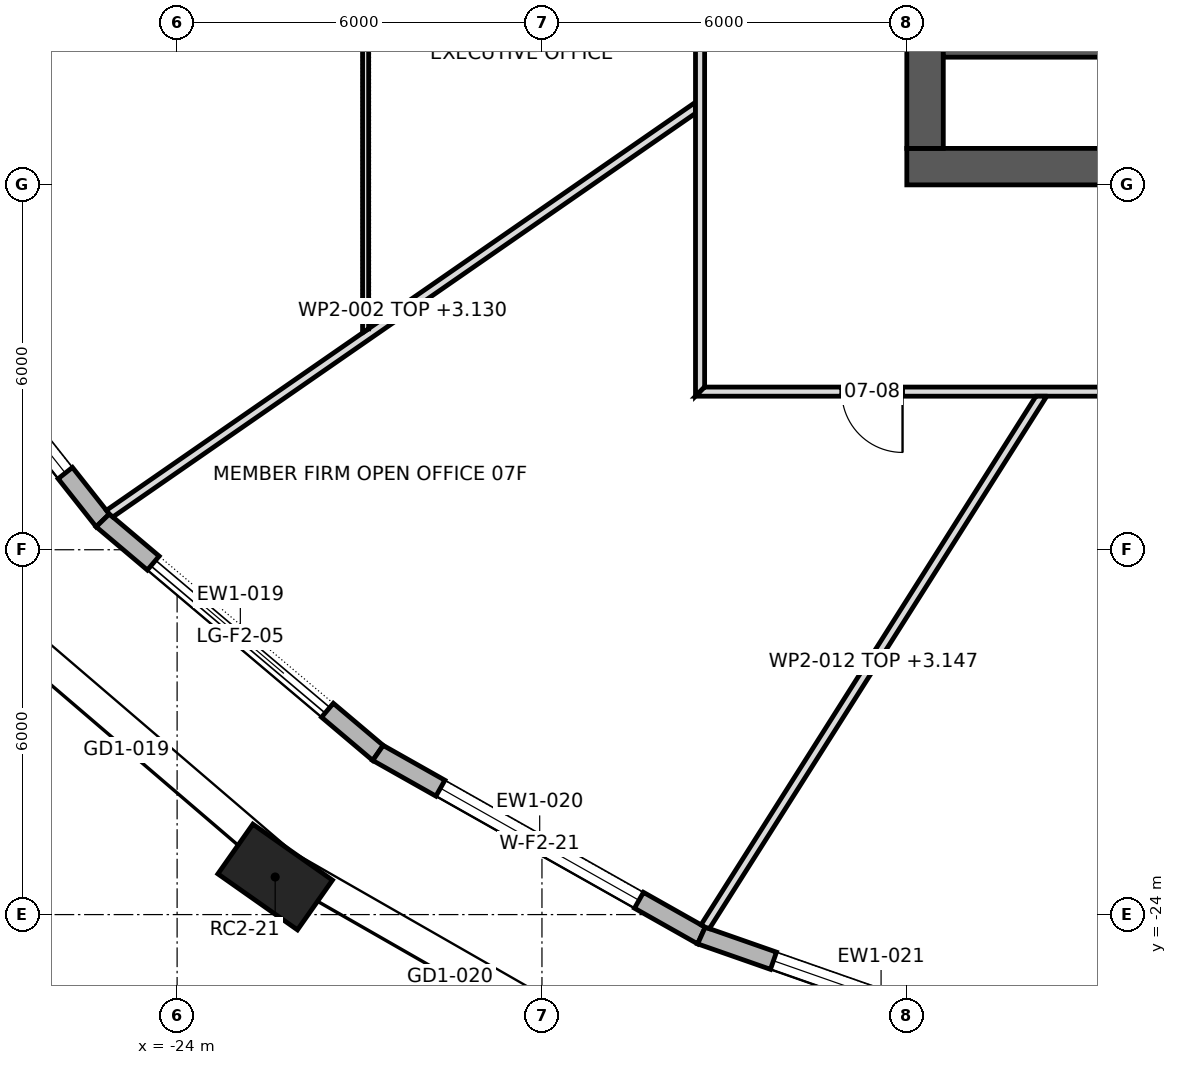
"""IFC4 building model, lengths in metres.
Left out: names, types, materials, properties, quantities, classifications, styles, units other than length and angle.
Written with IfcOpenShell. Run it as: python <this file> out.ifc"""

import sys

from ifc_helpers import new_model, si_unit, direction, frame, frame_2d, origin, origin_2d, place, context, subcontext, project, spatial, polyline, rectangle, outline, extrude, element, fill, save


model = new_model("IFC4")
c1 = context("Model", 3, precision=1e-05, world=origin(), true_north=direction((0.0, 1.0)))
c2 = subcontext(c1, "Body", "Model", "MODEL_VIEW")
j1 = project(units=[si_unit("LENGTHUNIT", "METRE"), si_unit("PLANEANGLEUNIT", "RADIAN")], contexts=[c1])
p1 = place(None, origin())
s1 = spatial("IfcSite", under=j1, at=p1, CompositionType="ELEMENT")
p2 = place(p1, origin())
s2 = spatial("IfcBuilding", under=s1, at=p2, CompositionType="ELEMENT")
p3 = place(p2, frame((0.0, 0.0, 104.5)))
s3 = spatial("IfcBuildingStorey", under=s2, at=p3, CompositionType="ELEMENT", Elevation=104.5)
p4 = place(p3, frame((-22.387, -23.382, 0.0), z_axis=(0.0, 0.0, 1.0), x_axis=(0.817910796357, -0.575345052297, 0.0)))
e1 = element("IfcColumn", 1, at=p4, inside=s3, PredefinedType="COLUMN", context=c2, shape_type="SweptSolid", body=[
    extrude(rectangle(XDim=1.6, YDim=1.0, at=origin_2d()), origin(), (0.0, 0.0, 1.0), 4.2),
])
p5 = place(p3, frame((-12.0, -11.7, 0.0), z_axis=(0.0, 0.0, 1.0), x_axis=(1.0, 0.0, 0.0)))
e2 = element("IfcWall", 2, at=p5, inside=s3, PredefinedType="SHEAR", context=c2, shape_type="SweptSolid", body=[
    extrude(rectangle(XDim=24.0, YDim=0.6, at=frame_2d((12.0, 0.0))), origin(), (0.0, 0.0, 1.0), 4.2),
])
p6 = place(p5, frame((9.975, 0.0, 0.0)))
e3 = element("IfcOpeningElement", 3, at=p6, cuts=e2, PredefinedType="OPENING", context=c2, shape_type="SweptSolid", body=[
    extrude(rectangle(XDim=0.9, YDim=2.1, at=frame_2d((0.45, 1.05))), frame((0.0, 0.312, 0.0), z_axis=(0.0, -1.0, 0.0), x_axis=(1.0, 0.0, 0.0)), (0.0, 0.0, 1.0), 0.624),
])
p7 = place(p5, frame((4.6, 0.0, 0.0)))
e4 = element("IfcOpeningElement", 4, at=p7, cuts=e2, PredefinedType="OPENING", context=c2, shape_type="SweptSolid", body=[
    extrude(rectangle(XDim=0.8, YDim=2.1, at=frame_2d((0.4, 1.05))), frame((0.0, 0.312, 0.0), z_axis=(0.0, -1.0, 0.0), x_axis=(1.0, 0.0, 0.0)), (0.0, 0.0, 1.0), 0.624),
])
p8 = place(p5, frame((7.0, 0.0, 0.0)))
e5 = element("IfcOpeningElement", 5, at=p8, cuts=e2, PredefinedType="OPENING", context=c2, shape_type="SweptSolid", body=[
    extrude(rectangle(XDim=0.8, YDim=2.1, at=frame_2d((0.4, 1.05))), frame((0.0, 0.312, 0.0), z_axis=(0.0, -1.0, 0.0), x_axis=(1.0, 0.0, 0.0)), (0.0, 0.0, 1.0), 0.624),
])
p9 = place(p5, frame((15.85, 0.0, 0.0)))
e6 = element("IfcOpeningElement", 6, at=p9, cuts=e2, PredefinedType="OPENING", context=c2, shape_type="SweptSolid", body=[
    extrude(rectangle(XDim=0.8, YDim=2.1, at=frame_2d((0.4, 1.05))), frame((0.0, 0.312, 0.0), z_axis=(0.0, -1.0, 0.0), x_axis=(1.0, 0.0, 0.0)), (0.0, 0.0, 1.0), 0.624),
])
p10 = place(p3, frame((-11.7, -11.4, 0.0), z_axis=(0.0, 0.0, 1.0), x_axis=(0.0, 1.0, 0.0)))
e7 = element("IfcWall", 7, at=p10, inside=s3, PredefinedType="SHEAR", context=c2, shape_type="SweptSolid", body=[
    extrude(rectangle(XDim=22.8, YDim=0.6, at=frame_2d((11.4, 0.0))), origin(), (0.0, 0.0, 1.0), 4.2),
])
p11 = place(p10, frame((10.2, 0.0, 0.0)))
e8 = element("IfcOpeningElement", 8, at=p11, cuts=e7, PredefinedType="OPENING", context=c2, shape_type="SweptSolid", body=[
    extrude(rectangle(XDim=2.4, YDim=2.1, at=frame_2d((1.2, 1.05))), frame((0.0, 0.312, 0.0), z_axis=(0.0, -1.0, 0.0), x_axis=(1.0, 0.0, 0.0)), (0.0, 0.0, 1.0), 0.624),
])
p12 = place(p10, frame((18.925, 0.0, 0.0)))
e9 = element("IfcOpeningElement", 9, at=p12, cuts=e7, PredefinedType="OPENING", context=c2, shape_type="SweptSolid", body=[
    extrude(rectangle(XDim=1.2, YDim=2.1, at=frame_2d((0.6, 1.05))), frame((0.0, 0.312, 0.0), z_axis=(0.0, -1.0, 0.0), x_axis=(1.0, 0.0, 0.0)), (0.0, 0.0, 1.0), 0.624),
])
p13 = place(p10, frame((2.675, 0.0, 0.0)))
e10 = element("IfcOpeningElement", 10, at=p13, cuts=e7, PredefinedType="OPENING", context=c2, shape_type="SweptSolid", body=[
    extrude(rectangle(XDim=1.2, YDim=2.1, at=frame_2d((0.6, 1.05))), frame((0.0, 0.312, 0.0), z_axis=(0.0, -1.0, 0.0), x_axis=(1.0, 0.0, 0.0)), (0.0, 0.0, 1.0), 0.624),
])
p14 = place(p3, frame((-28.781, -13.019, 0.0), z_axis=(0.0, 0.0, 1.0), x_axis=(0.620329992039, -0.784340934146, 0.0)))
e11 = element("IfcWall", 11, at=p14, inside=s3, PredefinedType="STANDARD", context=c2, shape_type="SweptSolid", body=[
    extrude(outline(polyline([(-0.016, -0.15), (5.75, -0.15), (5.72, 0.15), (0.016, 0.15), (-0.016, -0.15)])), origin(), (0.0, 0.0, 1.0), 3.9),
])
p15 = place(p14, frame((0.993, 0.0, 0.6)))
e12 = element("IfcOpeningElement", 12, at=p15, cuts=e11, PredefinedType="OPENING", context=c2, shape_type="SweptSolid", body=[
    extrude(rectangle(XDim=3.75, YDim=2.85, at=frame_2d((1.875, 1.425))), frame((0.0, 0.162, 0.0), z_axis=(0.0, -1.0, 0.0), x_axis=(1.0, 0.0, 0.0)), (0.0, 0.0, 1.0), 0.324),
])
p16 = place(p3, frame((-25.223, -17.518, 0.0), z_axis=(0.0, 0.0, 1.0), x_axis=(0.763894031266, -0.645341699409, 0.0)))
e13 = element("IfcWall", 13, at=p16, inside=s3, PredefinedType="STANDARD", context=c2, shape_type="SweptSolid", body=[
    extrude(outline(polyline([(-0.015, -0.15), (5.939, -0.15), (5.911, 0.15), (0.015, 0.15), (-0.015, -0.15)])), origin(), (0.0, 0.0, 1.0), 3.9),
])
p17 = place(p16, frame((1.087, 0.0, 0.0)))
e14 = element("IfcOpeningElement", 14, at=p17, cuts=e13, PredefinedType="OPENING", context=c2, shape_type="SweptSolid", body=[
    extrude(rectangle(XDim=3.75, YDim=3.45, at=frame_2d((1.875, 1.725))), frame((0.0, 0.162, 0.0), z_axis=(0.0, -1.0, 0.0), x_axis=(1.0, 0.0, 0.0)), (0.0, 0.0, 1.0), 0.324),
])
p18 = place(p3, frame((-20.697, -21.341, 0.0), z_axis=(0.0, 0.0, 1.0), x_axis=(0.870828448417, -0.491587035455, 0.0)))
e15 = element("IfcWall", 15, at=p18, inside=s3, PredefinedType="STANDARD", context=c2, shape_type="SweptSolid", body=[
    extrude(outline(polyline([(-0.014, -0.15), (6.122, -0.15), (6.095, 0.15), (0.014, 0.15), (-0.014, -0.15)])), origin(), (0.0, 0.0, 1.0), 3.9),
])
p19 = place(p18, frame((1.179, 0.0, 0.6)))
e16 = element("IfcOpeningElement", 16, at=p19, cuts=e15, PredefinedType="OPENING", context=c2, shape_type="SweptSolid", body=[
    extrude(rectangle(XDim=3.75, YDim=2.85, at=frame_2d((1.875, 1.425))), frame((0.0, 0.162, 0.0), z_axis=(0.0, -1.0, 0.0), x_axis=(1.0, 0.0, 0.0)), (0.0, 0.0, 1.0), 0.324),
])
p20 = place(p3, frame((-15.377, -24.344, 0.0), z_axis=(0.0, 0.0, 1.0), x_axis=(0.943866868202, -0.330326104193, 0.0)))
e17 = element("IfcWall", 17, at=p20, inside=s3, PredefinedType="STANDARD", context=c2, shape_type="SweptSolid", body=[
    extrude(outline(polyline([(-0.013, -0.15), (6.273, -0.15), (6.247, 0.15), (0.013, 0.15), (-0.013, -0.15)])), origin(), (0.0, 0.0, 1.0), 3.9),
])
p21 = place(p20, frame((1.255, 0.0, 0.6)))
e18 = element("IfcOpeningElement", 18, at=p21, cuts=e17, PredefinedType="OPENING", context=c2, shape_type="SweptSolid", body=[
    extrude(rectangle(XDim=3.75, YDim=2.85, at=frame_2d((1.875, 1.425))), frame((0.0, 0.162, 0.0), z_axis=(0.0, -1.0, 0.0), x_axis=(1.0, 0.0, 0.0)), (0.0, 0.0, 1.0), 0.324),
])
p22 = place(p3, frame((-11.4, -9.825, 0.0), z_axis=(0.0, 0.0, 1.0), x_axis=(1.0, 0.0, 0.0)))
e19 = element("IfcWall", 19, at=p22, inside=s3, PredefinedType="SHEAR", context=c2, shape_type="SweptSolid", body=[
    extrude(rectangle(XDim=8.0, YDim=0.15, at=frame_2d((4.0, 0.0))), origin(), (0.0, 0.0, 1.0), 3.9),
])
p23 = place(p3, frame((-25.12, -17.414, 0.0), z_axis=(0.0, 0.0, 1.0), x_axis=(0.822008683907, 0.569474954306, 0.0)))
e20 = element("IfcWall", 20, at=p23, inside=s3, PredefinedType="PARTITIONING", context=c2, shape_type="SweptSolid", body=[
    extrude(outline(polyline([(0.024, -0.075), (1.967, -0.075), (3.91, -0.075), (5.853, -0.075), (7.796, -0.075), (9.739, -0.075), (11.681, -0.075), (11.734, 0.002), (11.734, 0.002), (11.785, 0.074), (11.785, 0.075), (10.15, 0.075), (8.516, 0.075), (6.881, 0.075), (5.246, 0.075), (5.245, 0.072), (5.241, 0.075), (3.494, 0.075), (1.747, 0.075), (0.0, 0.075), (0.0, 0.07), (0.005, -0.002), (0.024, -0.075)])), origin(), (0.0, 0.0, 1.0), 3.13),
])
p24 = place(p3, frame((-20.9, -14.434, 0.0), z_axis=(0.0, 0.0, 1.0), x_axis=(0.0, 1.0, 0.0)))
e21 = element("IfcWall", 21, at=p24, inside=s3, PredefinedType="PARTITIONING", context=c2, shape_type="SweptSolid", body=[
    extrude(outline(polyline([(0.069, -0.05), (1.772, -0.05), (3.475, -0.05), (5.178, -0.05), (6.881, -0.05), (8.583, -0.05), (8.583, -0.05), (8.684, -0.05), (8.684, -0.05), (10.321, -0.05), (11.958, -0.05), (13.596, -0.05), (15.234, -0.05), (15.234, -0.05), (15.333, -0.05), (15.333, -0.05), (16.789, -0.05), (18.245, -0.05), (19.701, -0.05), (19.727, 0.05), (19.727, 0.05), (17.942, 0.05), (16.156, 0.05), (14.372, 0.05), (12.587, 0.05), (10.802, 0.05), (9.017, 0.05), (9.01, 0.048), (9.009, 0.05), (7.208, 0.05), (5.406, 0.05), (3.604, 0.05), (1.802, 0.05), (0.0, 0.05), (0.069, -0.05)])), origin(), (0.0, 0.0, 1.0), 3.9),
])
p25 = place(p24, frame((13.539, 0.0, 0.0)))
e22 = element("IfcOpeningElement", 22, at=p25, cuts=e21, PredefinedType="OPENING", context=c2, shape_type="SweptSolid", body=[
    extrude(rectangle(XDim=0.9, YDim=2.1, at=frame_2d((0.45, 1.05))), frame((0.0, 0.062, 0.0), z_axis=(0.0, -1.0, 0.0), x_axis=(1.0, 0.0, 0.0)), (0.0, 0.0, 1.0), 0.124),
])
p26 = place(p3, frame((-15.4, -15.475, 0.0), z_axis=(0.0, 0.0, 1.0), x_axis=(0.0, 1.0, 0.0)))
e23 = element("IfcWall", 23, at=p26, inside=s3, PredefinedType="PARTITIONING", context=c2, shape_type="SweptSolid", body=[
    extrude(outline(polyline([(0.15, -0.075), (2.066, -0.075), (3.981, -0.075), (5.897, -0.075), (7.812, -0.075), (9.728, -0.075), (11.644, -0.075), (13.56, -0.075), (15.475, -0.075), (17.391, -0.075), (19.306, -0.075), (21.222, -0.075), (23.138, -0.075), (25.053, -0.075), (26.969, -0.075), (28.885, -0.075), (30.8, -0.075), (30.95, 0.075), (29.016, 0.075), (27.081, 0.075), (25.147, 0.075), (23.212, 0.075), (21.278, 0.075), (19.344, 0.075), (17.409, 0.075), (15.475, 0.075), (13.541, 0.075), (11.606, 0.075), (9.672, 0.075), (7.738, 0.075), (5.803, 0.075), (3.869, 0.075), (1.935, 0.075), (0.0, 0.075), (0.15, -0.075)])), origin(), (0.0, 0.0, 1.0), 3.9),
])
p27 = place(p26, frame((24.25, 0.0, 0.0)))
e24 = element("IfcOpeningElement", 24, at=p27, cuts=e23, PredefinedType="OPENING", context=c2, shape_type="SweptSolid", body=[
    extrude(rectangle(XDim=1.8, YDim=2.1, at=frame_2d((0.9, 1.05))), frame((0.0, 0.087, 0.0), z_axis=(0.0, -1.0, 0.0), x_axis=(1.0, 0.0, 0.0)), (0.0, 0.0, 1.0), 0.174),
])
p28 = place(p26, frame((6.735, 0.0, 0.0)))
e25 = element("IfcOpeningElement", 25, at=p28, cuts=e23, PredefinedType="OPENING", context=c2, shape_type="SweptSolid", body=[
    extrude(rectangle(XDim=1.0, YDim=2.1, at=frame_2d((0.5, 1.05))), frame((0.0, 0.087, 0.0), z_axis=(0.0, -1.0, 0.0), x_axis=(1.0, 0.0, 0.0)), (0.0, 0.0, 1.0), 0.174),
])
p29 = place(p26, frame((12.5, 0.0, 0.0)))
e26 = element("IfcOpeningElement", 26, at=p29, cuts=e23, PredefinedType="OPENING", context=c2, shape_type="SweptSolid", body=[
    extrude(rectangle(XDim=1.0, YDim=2.1, at=frame_2d((0.5, 1.05))), frame((0.0, 0.087, 0.0), z_axis=(0.0, -1.0, 0.0), x_axis=(1.0, 0.0, 0.0)), (0.0, 0.0, 1.0), 0.174),
])
p30 = place(p26, frame((17.375, 0.0, 0.0)))
e27 = element("IfcOpeningElement", 27, at=p30, cuts=e23, PredefinedType="OPENING", context=c2, shape_type="SweptSolid", body=[
    extrude(rectangle(XDim=1.0, YDim=2.1, at=frame_2d((0.5, 1.05))), frame((0.0, 0.087, 0.0), z_axis=(0.0, -1.0, 0.0), x_axis=(1.0, 0.0, 0.0)), (0.0, 0.0, 1.0), 0.174),
])
p31 = place(p3, frame((-15.475, -15.4, 0.0), z_axis=(0.0, 0.0, 1.0), x_axis=(1.0, 0.0, 0.0)))
e28 = element("IfcWall", 28, at=p31, inside=s3, PredefinedType="PARTITIONING", context=c2, shape_type="SweptSolid", body=[
    extrude(outline(polyline([(0.0, -0.075), (1.935, -0.075), (3.869, -0.075), (5.803, -0.075), (7.738, -0.075), (9.672, -0.075), (11.606, -0.075), (13.541, -0.075), (15.475, -0.075), (17.409, -0.075), (19.344, -0.075), (21.278, -0.075), (23.212, -0.075), (25.147, -0.075), (27.081, -0.075), (29.016, -0.075), (30.95, -0.075), (30.8, 0.075), (28.885, 0.075), (26.969, 0.075), (25.053, 0.075), (23.138, 0.075), (21.222, 0.075), (19.306, 0.075), (17.391, 0.075), (15.475, 0.075), (13.56, 0.075), (11.644, 0.075), (9.728, 0.075), (7.812, 0.075), (5.897, 0.075), (3.981, 0.075), (2.066, 0.075), (0.15, 0.075), (0.0, -0.075)])), origin(), (0.0, 0.0, 1.0), 3.9),
])
p32 = place(p31, frame((2.405, 0.0, 0.0)))
e29 = element("IfcOpeningElement", 29, at=p32, cuts=e28, PredefinedType="OPENING", context=c2, shape_type="SweptSolid", body=[
    extrude(rectangle(XDim=1.0, YDim=2.1, at=frame_2d((0.5, 1.05))), frame((0.0, 0.087, 0.0), z_axis=(0.0, -1.0, 0.0), x_axis=(1.0, 0.0, 0.0)), (0.0, 0.0, 1.0), 0.174),
])
p33 = place(p31, frame((10.605, 0.0, 0.0)))
e30 = element("IfcOpeningElement", 30, at=p33, cuts=e28, PredefinedType="OPENING", context=c2, shape_type="SweptSolid", body=[
    extrude(rectangle(XDim=1.8, YDim=2.1, at=frame_2d((0.9, 1.05))), frame((0.0, 0.087, 0.0), z_axis=(0.0, -1.0, 0.0), x_axis=(1.0, 0.0, 0.0)), (0.0, 0.0, 1.0), 0.174),
])
p34 = place(p31, frame((22.955, 0.0, 0.0)))
e31 = element("IfcOpeningElement", 31, at=p34, cuts=e28, PredefinedType="OPENING", context=c2, shape_type="SweptSolid", body=[
    extrude(rectangle(XDim=1.8, YDim=2.1, at=frame_2d((0.9, 1.05))), frame((0.0, 0.087, 0.0), z_axis=(0.0, -1.0, 0.0), x_axis=(1.0, 0.0, 0.0)), (0.0, 0.0, 1.0), 0.174),
])
p35 = place(p3, frame((-9.762, -15.435, 0.0), z_axis=(0.0, 0.0, 1.0), x_axis=(-0.535189090909, -0.844732287161, 0.0)))
e32 = element("IfcWall", 32, at=p35, inside=s3, PredefinedType="PARTITIONING", context=c2, shape_type="SweptSolid", body=[
    extrude(outline(polyline([(10.386, -0.075), (10.386, -0.069), (10.382, 0.004), (10.365, 0.075), (8.638, 0.075), (6.91, 0.075), (5.183, 0.075), (3.455, 0.075), (1.728, 0.075), (0.0, 0.075), (0.0, 0.075), (0.095, -0.075), (1.81, -0.075), (3.525, -0.075), (5.24, -0.075), (6.955, -0.075), (8.671, -0.075), (10.386, -0.075)])), origin(), (0.0, 0.0, 1.0), 3.147),
])
p36 = place(p15, origin())
e33 = element("IfcWindow", 33, at=p36, inside=s3, PartitioningType="TRIPLE_PANEL_VERTICAL", PredefinedType="WINDOW", context=c2, shape_type="SweptSolid", body=[
    extrude(rectangle(XDim=3.75, YDim=2.85, at=frame_2d((1.875, 1.425))), frame((0.0, 0.03, 0.0), z_axis=(0.0, -1.0, 0.0), x_axis=(1.0, 0.0, 0.0)), (0.0, 0.0, 1.0), 0.06),
])
fill(e12, e33)
p37 = place(p17, origin())
e34 = element("IfcDoor", 34, at=p37, inside=s3, OperationType="DOUBLE_DOOR_SLIDING", PredefinedType="DOOR", context=c2, shape_type="SweptSolid", body=[
    extrude(rectangle(XDim=3.75, YDim=3.45, at=frame_2d((1.875, 1.725))), frame((0.0, 0.025, 0.0), z_axis=(0.0, -1.0, 0.0), x_axis=(1.0, 0.0, 0.0)), (0.0, 0.0, 1.0), 0.05),
])
fill(e14, e34)
p38 = place(p19, origin())
e35 = element("IfcWindow", 35, at=p38, inside=s3, PartitioningType="TRIPLE_PANEL_VERTICAL", PredefinedType="WINDOW", context=c2, shape_type="SweptSolid", body=[
    extrude(rectangle(XDim=3.75, YDim=2.85, at=frame_2d((1.875, 1.425))), frame((0.0, 0.03, 0.0), z_axis=(0.0, -1.0, 0.0), x_axis=(1.0, 0.0, 0.0)), (0.0, 0.0, 1.0), 0.06),
])
fill(e16, e35)
p39 = place(p21, origin())
e36 = element("IfcWindow", 36, at=p39, inside=s3, PartitioningType="TRIPLE_PANEL_VERTICAL", PredefinedType="WINDOW", context=c2, shape_type="SweptSolid", body=[
    extrude(rectangle(XDim=3.75, YDim=2.85, at=frame_2d((1.875, 1.425))), frame((0.0, 0.03, 0.0), z_axis=(0.0, -1.0, 0.0), x_axis=(1.0, 0.0, 0.0)), (0.0, 0.0, 1.0), 0.06),
])
fill(e18, e36)
p40 = place(p32, frame((1.0, 0.0, 0.0), z_axis=(0.0, 0.0, 1.0), x_axis=(-1.0, 0.0, 0.0)))
e37 = element("IfcDoor", 37, at=p40, inside=s3, OperationType="SINGLE_SWING_RIGHT", PredefinedType="DOOR", context=c2, shape_type="SweptSolid", body=[
    extrude(rectangle(XDim=1.0, YDim=2.1, at=frame_2d((0.5, 1.05))), frame((0.0, 0.025, 0.0), z_axis=(0.0, -1.0, 0.0), x_axis=(1.0, 0.0, 0.0)), (0.0, 0.0, 1.0), 0.05),
])
fill(e29, e37)
save(model, sys.argv[1])
